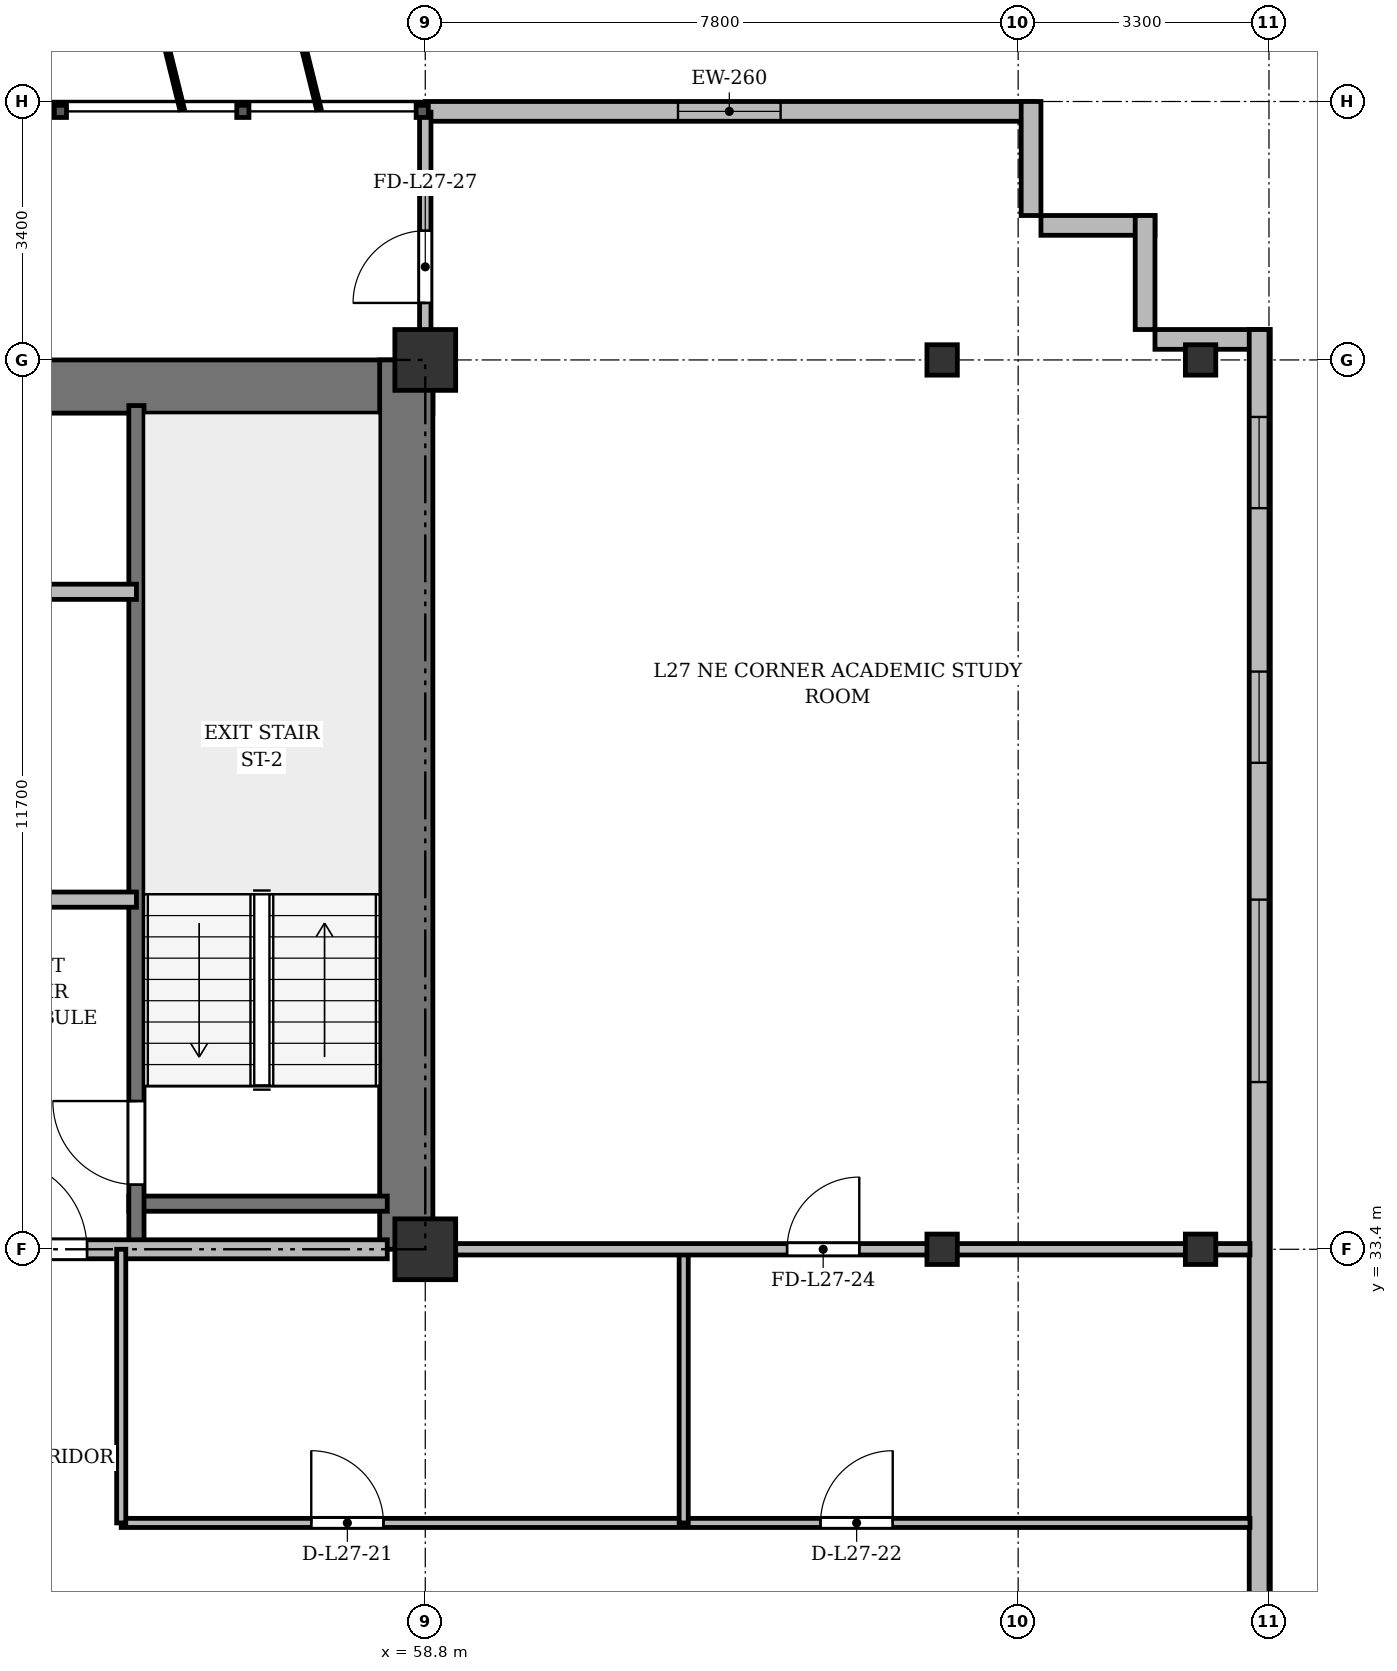
"""IFC4 building model, lengths in metres.
Left out: names, types, materials, properties, quantities, classifications, styles, units other than length and angle.
Written with IfcOpenShell. Run it as: python <this file> out.ifc"""

import sys

from ifc_helpers import new_model, si_unit, direction, frame, frame_2d, origin, origin_2d, place, context, subcontext, project, spatial, rectangle, i_section, extrude, source, transform, mapped, element, fill, save


model = new_model("IFC4")
c1 = context("Model", 3, precision=1e-05, world=origin(), true_north=direction((0.0, 1.0)))
c2 = subcontext(c1, "Body", "Model", "MODEL_VIEW")
j1 = project(units=[si_unit("LENGTHUNIT", "METRE"), si_unit("PLANEANGLEUNIT", "RADIAN")], contexts=[c1])
p1 = place(None, origin())
s1 = spatial("IfcSite", under=j1, at=p1, CompositionType="ELEMENT")
p2 = place(p1, origin())
s2 = spatial("IfcBuilding", under=s1, at=p2, CompositionType="ELEMENT")
p3 = place(p2, frame((0.0, 0.0, 106.9)))
s3 = spatial("IfcBuildingStorey", under=s2, at=p3, CompositionType="ELEMENT", Elevation=106.9)
m1 = source(origin(), c2, "Body", "SweptSolid", [
    extrude(rectangle(XDim=0.8, YDim=0.8, at=origin_2d()), origin(), (0.0, 0.0, 1.0), 3.6),
])
for number, where, z_axis, x_axis in (
    (1, (58.8, 33.4, 0.0), (0.0, 0.0, 1.0), (1.0, 0.0, 0.0)),
    (2, (58.8, 45.1, 0.0), (0.0, 0.0, 1.0), (1.0, 0.0, 0.0)),
):
    element("IfcColumn", number, at=place(p3, frame(where, z_axis=z_axis, x_axis=x_axis)), inside=s3, PredefinedType="COLUMN", context=c2, shape_type="MappedRepresentation", body=[
        mapped(m1, transform((0.0, 0.0, 0.0), x_axis=(1.0, 0.0, 0.0), y_axis=(0.0, 1.0, 0.0), z_axis=(0.0, 0.0, 1.0), scale=1.0)),
    ])
m2 = source(origin(), c2, "Body", "SweptSolid", [
    extrude(i_section(OverallWidth=0.4, OverallDepth=0.4, WebThickness=0.022, FlangeThickness=0.035, at=origin_2d()), origin(), (0.0, 0.0, 1.0), 3.6),
])
for number, where, z_axis, x_axis in (
    (3, (65.6, 33.4, 0.0), (0.0, 0.0, 1.0), (1.0, 0.0, 0.0)),
    (4, (65.6, 45.1, 0.0), (0.0, 0.0, 1.0), (1.0, 0.0, 0.0)),
    (5, (69.0, 33.4, 0.0), (0.0, 0.0, 1.0), (1.0, 0.0, 0.0)),
    (6, (69.0, 45.1, 0.0), (0.0, 0.0, 1.0), (1.0, 0.0, 0.0)),
):
    element("IfcColumn", number, at=place(p3, frame(where, z_axis=z_axis, x_axis=x_axis)), inside=s3, PredefinedType="COLUMN", context=c2, shape_type="MappedRepresentation", body=[
        mapped(m2, transform((0.0, 0.0, 0.0), x_axis=(1.0, 0.0, 0.0), y_axis=(0.0, 1.0, 0.0), z_axis=(0.0, 0.0, 1.0), scale=1.0)),
    ])
p4 = place(p3, frame((58.8, 48.37, 0.0), z_axis=(0.0, 0.0, 1.0), x_axis=(1.0, 0.0, 0.0)))
e7 = element("IfcWall", 7, at=p4, inside=s3, PredefinedType="SOLIDWALL", context=c2, shape_type="SweptSolid", body=[
    extrude(rectangle(XDim=8.0, YDim=0.26, at=frame_2d((4.0, 0.0))), origin(), (0.0, 0.0, 1.0), 3.34),
])
p5 = place(p4, frame((3.325, 0.0, 0.9)))
e8 = element("IfcOpeningElement", 8, at=p5, cuts=e7, PredefinedType="OPENING", context=c2, shape_type="SweptSolid", body=[
    extrude(rectangle(XDim=1.35, YDim=1.5, at=frame_2d((0.675, 0.75))), frame((0.0, 0.14, 0.0), z_axis=(0.0, -1.0, 0.0), x_axis=(1.0, 0.0, 0.0)), (0.0, 0.0, 1.0), 0.28),
])
for number, where, z_axis, x_axis in (
    (9, (66.77, 48.5, 0.0), (0.0, 0.0, 1.0), (0.0, -1.0, 0.0)),
    (10, (66.9, 46.87, 0.0), (0.0, 0.0, 1.0), (1.0, 0.0, 0.0)),
    (11, (68.27, 47.0, 0.0), (0.0, 0.0, 1.0), (0.0, -1.0, 0.0)),
):
    element("IfcWall", number, at=place(p3, frame(where, z_axis=z_axis, x_axis=x_axis)), inside=s3, PredefinedType="SOLIDWALL", context=c2, shape_type="SweptSolid", body=[
        extrude(rectangle(XDim=1.5, YDim=0.26, at=frame_2d((0.75, 0.0))), origin(), (0.0, 0.0, 1.0), 3.34),
    ])
p6 = place(p3, frame((68.4, 45.37, 0.0), z_axis=(0.0, 0.0, 1.0), x_axis=(1.0, 0.0, 0.0)))
e12 = element("IfcWall", 12, at=p6, inside=s3, PredefinedType="SOLIDWALL", context=c2, shape_type="SweptSolid", body=[
    extrude(rectangle(XDim=1.5, YDim=0.26, at=frame_2d((0.75, 0.0))), origin(), (0.0, 0.0, 1.0), 2.752),
])
p7 = place(p3, frame((69.77, 45.5, 0.0), z_axis=(0.0, 0.0, 1.0), x_axis=(0.0, -1.0, 0.0)))
e13 = element("IfcWall", 13, at=p7, inside=s3, PredefinedType="SOLIDWALL", context=c2, shape_type="SweptSolid", body=[
    extrude(rectangle(XDim=39.6, YDim=0.26, at=frame_2d((19.8, 0.0))), origin(), (0.0, 0.0, 1.0), 3.34),
])
p8 = place(p7, frame((36.95, 0.0, 0.92)))
e14 = element("IfcOpeningElement", 14, at=p8, cuts=e13, PredefinedType="OPENING", context=c2, shape_type="SweptSolid", body=[
    extrude(rectangle(XDim=1.2, YDim=1.65, at=frame_2d((0.6, 0.825))), frame((0.0, 0.14, 0.0), z_axis=(0.0, -1.0, 0.0), x_axis=(1.0, 0.0, 0.0)), (0.0, 0.0, 1.0), 0.28),
])
p9 = place(p7, frame((32.9, 0.0, 0.92)))
e15 = element("IfcOpeningElement", 15, at=p9, cuts=e13, PredefinedType="OPENING", context=c2, shape_type="SweptSolid", body=[
    extrude(rectangle(XDim=2.4, YDim=2.1, at=frame_2d((1.2, 1.05))), frame((0.0, 0.14, 0.0), z_axis=(0.0, -1.0, 0.0), x_axis=(1.0, 0.0, 0.0)), (0.0, 0.0, 1.0), 0.28),
])
p10 = place(p7, frame((28.7, 0.0, 0.92)))
e16 = element("IfcOpeningElement", 16, at=p10, cuts=e13, PredefinedType="OPENING", context=c2, shape_type="SweptSolid", body=[
    extrude(rectangle(XDim=2.4, YDim=2.1, at=frame_2d((1.2, 1.05))), frame((0.0, 0.14, 0.0), z_axis=(0.0, -1.0, 0.0), x_axis=(1.0, 0.0, 0.0)), (0.0, 0.0, 1.0), 0.28),
])
p11 = place(p7, frame((21.5, 0.0, 0.92)))
e17 = element("IfcOpeningElement", 17, at=p11, cuts=e13, PredefinedType="OPENING", context=c2, shape_type="SweptSolid", body=[
    extrude(rectangle(XDim=2.4, YDim=2.1, at=frame_2d((1.2, 1.05))), frame((0.0, 0.14, 0.0), z_axis=(0.0, -1.0, 0.0), x_axis=(1.0, 0.0, 0.0)), (0.0, 0.0, 1.0), 0.28),
])
p12 = place(p7, frame((7.5, 0.0, 0.92)))
e18 = element("IfcOpeningElement", 18, at=p12, cuts=e13, PredefinedType="OPENING", context=c2, shape_type="SweptSolid", body=[
    extrude(rectangle(XDim=2.4, YDim=2.1, at=frame_2d((1.2, 1.05))), frame((0.0, 0.14, 0.0), z_axis=(0.0, -1.0, 0.0), x_axis=(1.0, 0.0, 0.0)), (0.0, 0.0, 1.0), 0.28),
])
p13 = place(p7, frame((4.5, 0.0, 0.92)))
e19 = element("IfcOpeningElement", 19, at=p13, cuts=e13, PredefinedType="OPENING", context=c2, shape_type="SweptSolid", body=[
    extrude(rectangle(XDim=1.2, YDim=1.65, at=frame_2d((0.6, 0.825))), frame((0.0, 0.14, 0.0), z_axis=(0.0, -1.0, 0.0), x_axis=(1.0, 0.0, 0.0)), (0.0, 0.0, 1.0), 0.28),
])
p14 = place(p7, frame((1.15, 0.0, 0.92)))
e20 = element("IfcOpeningElement", 20, at=p14, cuts=e13, PredefinedType="OPENING", context=c2, shape_type="SweptSolid", body=[
    extrude(rectangle(XDim=1.2, YDim=1.65, at=frame_2d((0.6, 0.825))), frame((0.0, 0.14, 0.0), z_axis=(0.0, -1.0, 0.0), x_axis=(1.0, 0.0, 0.0)), (0.0, 0.0, 1.0), 0.28),
])
p15 = place(p3, frame((15.5, 44.75, 0.0), z_axis=(0.0, 0.0, 1.0), x_axis=(1.0, 0.0, 0.0)))
e21 = element("IfcWall", 21, at=p15, inside=s3, PredefinedType="SHEAR", context=c2, shape_type="SweptSolid", body=[
    extrude(rectangle(XDim=43.4, YDim=0.7, at=frame_2d((21.7, 0.0))), origin(), (0.0, 0.0, 1.0), 3.34),
])
p16 = place(p3, frame((58.55, 33.4, 0.0), z_axis=(0.0, 0.0, 1.0), x_axis=(0.0, 1.0, 0.0)))
e22 = element("IfcWall", 22, at=p16, inside=s3, PredefinedType="SHEAR", context=c2, shape_type="SweptSolid", body=[
    extrude(rectangle(XDim=11.7, YDim=0.7, at=frame_2d((5.85, 0.0))), origin(), (0.0, 0.0, 1.0), 3.34),
])
p17 = place(p3, frame((54.9, 34.0, 0.0), z_axis=(0.0, 0.0, 1.0), x_axis=(1.0, 0.0, 0.0)))
e23 = element("IfcWall", 23, at=p17, inside=s3, PredefinedType="SHEAR", context=c2, shape_type="SweptSolid", body=[
    extrude(rectangle(XDim=3.4, YDim=0.2, at=frame_2d((1.7, 0.0))), origin(), (0.0, 0.0, 1.0), 3.34),
])
p18 = place(p3, frame((55.0, 33.4, 0.0), z_axis=(0.0, 0.0, 1.0), x_axis=(0.0, 1.0, 0.0)))
e24 = element("IfcWall", 24, at=p18, inside=s3, PredefinedType="SHEAR", context=c2, shape_type="SweptSolid", body=[
    extrude(rectangle(XDim=11.1, YDim=0.2, at=frame_2d((5.55, 0.0))), origin(), (0.0, 0.0, 1.0), 3.34),
])
p19 = place(p18, frame((0.85, 0.0, 0.0)))
e25 = element("IfcOpeningElement", 25, at=p19, cuts=e24, PredefinedType="OPENING", context=c2, shape_type="SweptSolid", body=[
    extrude(rectangle(XDim=1.1, YDim=2.15, at=frame_2d((0.55, 1.075))), frame((0.0, 0.11, 0.0), z_axis=(0.0, -1.0, 0.0), x_axis=(1.0, 0.0, 0.0)), (0.0, 0.0, 1.0), 0.22),
])
p20 = place(p3, frame((47.15, 42.05, 0.0), z_axis=(0.0, 0.0, 1.0), x_axis=(1.0, 0.0, 0.0)))
e26 = element("IfcWall", 26, at=p20, inside=s3, PredefinedType="SOLIDWALL", context=c2, shape_type="SweptSolid", body=[
    extrude(rectangle(XDim=7.85, YDim=0.2, at=frame_2d((3.925, 0.0))), origin(), (0.0, 0.0, 1.0), 2.84),
])
p21 = place(p20, frame((0.75, 0.0, 0.0)))
e27 = element("IfcOpeningElement", 27, at=p21, cuts=e26, PredefinedType="OPENING", context=c2, shape_type="SweptSolid", body=[
    extrude(rectangle(XDim=0.9, YDim=2.1, at=frame_2d((0.45, 1.05))), frame((0.0, 0.11, 0.0), z_axis=(0.0, -1.0, 0.0), x_axis=(1.0, 0.0, 0.0)), (0.0, 0.0, 1.0), 0.22),
])
p22 = place(p20, frame((3.85, 0.0, 0.0)))
e28 = element("IfcOpeningElement", 28, at=p22, cuts=e26, PredefinedType="OPENING", context=c2, shape_type="SweptSolid", body=[
    extrude(rectangle(XDim=0.9, YDim=2.1, at=frame_2d((0.45, 1.05))), frame((0.0, 0.11, 0.0), z_axis=(0.0, -1.0, 0.0), x_axis=(1.0, 0.0, 0.0)), (0.0, 0.0, 1.0), 0.22),
])
p23 = place(p3, frame((52.45, 38.0, 0.0), z_axis=(0.0, 0.0, 1.0), x_axis=(1.0, 0.0, 0.0)))
e29 = element("IfcWall", 29, at=p23, inside=s3, PredefinedType="PARTITIONING", context=c2, shape_type="SweptSolid", body=[
    extrude(rectangle(XDim=2.55, YDim=0.2, at=frame_2d((1.275, 0.0))), origin(), (0.0, 0.0, 1.0), 3.34),
])
p24 = place(p3, frame((47.15, 33.4, 0.0), z_axis=(0.0, 0.0, 1.0), x_axis=(1.0, 0.0, 0.0)))
e30 = element("IfcWall", 30, at=p24, inside=s3, PredefinedType="PARTITIONING", context=c2, shape_type="SweptSolid", body=[
    extrude(rectangle(XDim=11.15, YDim=0.25, at=frame_2d((5.575, 0.0))), origin(), (0.0, 0.0, 1.0), 2.752),
])
p25 = place(p24, frame((0.7, 0.0, 0.0)))
e31 = element("IfcOpeningElement", 31, at=p25, cuts=e30, PredefinedType="OPENING", context=c2, shape_type="SweptSolid", body=[
    extrude(rectangle(XDim=0.95, YDim=2.15, at=frame_2d((0.475, 1.075))), frame((0.0, 0.135, 0.0), z_axis=(0.0, -1.0, 0.0), x_axis=(1.0, 0.0, 0.0)), (0.0, 0.0, 1.0), 0.27),
])
p26 = place(p24, frame((6.0, 0.0, 0.0)))
e32 = element("IfcOpeningElement", 32, at=p26, cuts=e30, PredefinedType="OPENING", context=c2, shape_type="SweptSolid", body=[
    extrude(rectangle(XDim=1.2, YDim=2.15, at=frame_2d((0.6, 1.075))), frame((0.0, 0.135, 0.0), z_axis=(0.0, -1.0, 0.0), x_axis=(1.0, 0.0, 0.0)), (0.0, 0.0, 1.0), 0.27),
])
p27 = place(p3, frame((54.8, 29.8, 0.0), z_axis=(0.0, 0.0, 1.0), x_axis=(1.0, 0.0, 0.0)))
e33 = element("IfcWall", 33, at=p27, inside=s3, PredefinedType="PARTITIONING", context=c2, shape_type="SweptSolid", body=[
    extrude(rectangle(XDim=14.85, YDim=0.12, at=frame_2d((7.425, 0.0))), origin(), (0.0, 0.0, 1.0), 2.84),
])
p28 = place(p27, frame((2.5, 0.0, 0.0)))
e34 = element("IfcOpeningElement", 34, at=p28, cuts=e33, PredefinedType="OPENING", context=c2, shape_type="SweptSolid", body=[
    extrude(rectangle(XDim=0.95, YDim=2.15, at=frame_2d((0.475, 1.075))), frame((0.0, 0.07, 0.0), z_axis=(0.0, -1.0, 0.0), x_axis=(1.0, 0.0, 0.0)), (0.0, 0.0, 1.0), 0.14),
])
p29 = place(p27, frame((9.2, 0.0, 0.0)))
e35 = element("IfcOpeningElement", 35, at=p29, cuts=e33, PredefinedType="OPENING", context=c2, shape_type="SweptSolid", body=[
    extrude(rectangle(XDim=0.95, YDim=2.15, at=frame_2d((0.475, 1.075))), frame((0.0, 0.07, 0.0), z_axis=(0.0, -1.0, 0.0), x_axis=(1.0, 0.0, 0.0)), (0.0, 0.0, 1.0), 0.14),
])
for number, where, z_axis, x_axis in (
    (36, (62.2, 29.8, 0.0), (0.0, 0.0, 1.0), (0.0, 1.0, 0.0)),
    (37, (54.8, 29.8, 0.0), (0.0, 0.0, 1.0), (0.0, 1.0, 0.0)),
):
    element("IfcWall", number, at=place(p3, frame(where, z_axis=z_axis, x_axis=x_axis)), inside=s3, PredefinedType="PARTITIONING", context=c2, shape_type="SweptSolid", body=[
        extrude(rectangle(XDim=3.6, YDim=0.12, at=frame_2d((1.8, 0.0))), origin(), (0.0, 0.0, 1.0), 2.752),
    ])
p30 = place(p3, frame((58.8, 33.4, 0.0), z_axis=(0.0, 0.0, 1.0), x_axis=(1.0, 0.0, 0.0)))
e38 = element("IfcWall", 38, at=p30, inside=s3, PredefinedType="PARTITIONING", context=c2, shape_type="SweptSolid", body=[
    extrude(rectangle(XDim=10.85, YDim=0.15, at=frame_2d((5.425, 0.0))), origin(), (0.0, 0.0, 1.0), 2.752),
])
p31 = place(p30, frame((4.76, 0.0, 0.0)))
e39 = element("IfcOpeningElement", 39, at=p31, cuts=e38, PredefinedType="OPENING", context=c2, shape_type="SweptSolid", body=[
    extrude(rectangle(XDim=0.95, YDim=2.15, at=frame_2d((0.475, 1.075))), frame((0.0, 0.085, 0.0), z_axis=(0.0, -1.0, 0.0), x_axis=(1.0, 0.0, 0.0)), (0.0, 0.0, 1.0), 0.17),
])
p32 = place(p3, frame((58.8, 44.75, 0.0), z_axis=(0.0, 0.0, 1.0), x_axis=(0.0, 1.0, 0.0)))
e40 = element("IfcWall", 40, at=p32, inside=s3, PredefinedType="PARTITIONING", context=c2, shape_type="SweptSolid", body=[
    extrude(rectangle(XDim=3.61, YDim=0.15, at=frame_2d((1.805, 0.0))), origin(), (0.0, 0.0, 1.0), 2.84),
])
p33 = place(p32, frame((1.1, 0.0, 0.0)))
e41 = element("IfcOpeningElement", 41, at=p33, cuts=e40, PredefinedType="OPENING", context=c2, shape_type="SweptSolid", body=[
    extrude(rectangle(XDim=0.95, YDim=2.15, at=frame_2d((0.475, 1.075))), frame((0.0, 0.085, 0.0), z_axis=(0.0, -1.0, 0.0), x_axis=(1.0, 0.0, 0.0)), (0.0, 0.0, 1.0), 0.17),
])
m3 = source(origin(), c2, "Body", "SweptSolid", [
    extrude(rectangle(XDim=1.35, YDim=1.5, at=frame_2d((0.675, 0.75))), frame((0.0, 0.03, 0.0), z_axis=(0.0, -1.0, 0.0), x_axis=(1.0, 0.0, 0.0)), (0.0, 0.0, 1.0), 0.06),
])
p34 = place(p5, origin())
e42 = element("IfcWindow", 42, at=p34, inside=s3, PartitioningType="SINGLE_PANEL", PredefinedType="WINDOW", context=c2, shape_type="MappedRepresentation", body=[
    mapped(m3, transform((0.0, 0.0, 0.0), x_axis=(1.0, 0.0, 0.0), y_axis=(0.0, 1.0, 0.0), z_axis=(0.0, 0.0, 1.0), scale=1.0)),
])
fill(e8, e42)
m4 = source(origin(), c2, "Body", "SweptSolid", [
    extrude(rectangle(XDim=2.4, YDim=2.1, at=frame_2d((1.2, 1.05))), frame((0.0, 0.03, 0.0), z_axis=(0.0, -1.0, 0.0), x_axis=(1.0, 0.0, 0.0)), (0.0, 0.0, 1.0), 0.06),
])
p35 = place(p12, origin())
e43 = element("IfcWindow", 43, at=p35, inside=s3, PartitioningType="SINGLE_PANEL", PredefinedType="WINDOW", context=c2, shape_type="MappedRepresentation", body=[
    mapped(m4, transform((0.0, 0.0, 0.0), x_axis=(1.0, 0.0, 0.0), y_axis=(0.0, 1.0, 0.0), z_axis=(0.0, 0.0, 1.0), scale=1.0)),
])
fill(e18, e43)
m5 = source(origin(), c2, "Body", "SweptSolid", [
    extrude(rectangle(XDim=1.2, YDim=1.65, at=frame_2d((0.6, 0.825))), frame((0.0, 0.03, 0.0), z_axis=(0.0, -1.0, 0.0), x_axis=(1.0, 0.0, 0.0)), (0.0, 0.0, 1.0), 0.06),
])
p36 = place(p13, origin())
e44 = element("IfcWindow", 44, at=p36, inside=s3, PartitioningType="SINGLE_PANEL", PredefinedType="WINDOW", context=c2, shape_type="MappedRepresentation", body=[
    mapped(m5, transform((0.0, 0.0, 0.0), x_axis=(1.0, 0.0, 0.0), y_axis=(0.0, 1.0, 0.0), z_axis=(0.0, 0.0, 1.0), scale=1.0)),
])
fill(e19, e44)
p37 = place(p14, origin())
e45 = element("IfcWindow", 45, at=p37, inside=s3, PartitioningType="SINGLE_PANEL", PredefinedType="WINDOW", context=c2, shape_type="MappedRepresentation", body=[
    mapped(m5, transform((0.0, 0.0, 0.0), x_axis=(1.0, 0.0, 0.0), y_axis=(0.0, 1.0, 0.0), z_axis=(0.0, 0.0, 1.0), scale=1.0)),
])
fill(e20, e45)
m6 = source(origin(), c2, "Body", "SweptSolid", [
    extrude(rectangle(XDim=1.1, YDim=2.15, at=frame_2d((0.55, 1.075))), frame((0.0, 0.025, 0.0), z_axis=(0.0, -1.0, 0.0), x_axis=(1.0, 0.0, 0.0)), (0.0, 0.0, 1.0), 0.05),
])
p38 = place(p19, origin())
e46 = element("IfcDoor", 46, at=p38, inside=s3, OperationType="SINGLE_SWING_RIGHT", PredefinedType="DOOR", context=c2, shape_type="MappedRepresentation", body=[
    mapped(m6, transform((0.0, 0.0, 0.0), x_axis=(1.0, 0.0, 0.0), y_axis=(0.0, 1.0, 0.0), z_axis=(0.0, 0.0, 1.0), scale=1.0)),
])
fill(e25, e46)
m7 = source(origin(), c2, "Body", "SweptSolid", [
    extrude(rectangle(XDim=1.2, YDim=2.15, at=frame_2d((0.6, 1.075))), frame((0.0, 0.025, 0.0), z_axis=(0.0, -1.0, 0.0), x_axis=(1.0, 0.0, 0.0)), (0.0, 0.0, 1.0), 0.05),
])
p39 = place(p26, origin())
e47 = element("IfcDoor", 47, at=p39, inside=s3, OperationType="SINGLE_SWING_LEFT", PredefinedType="DOOR", context=c2, shape_type="MappedRepresentation", body=[
    mapped(m7, transform((0.0, 0.0, 0.0), x_axis=(1.0, 0.0, 0.0), y_axis=(0.0, 1.0, 0.0), z_axis=(0.0, 0.0, 1.0), scale=1.0)),
])
fill(e32, e47)
m8 = source(origin(), c2, "Body", "SweptSolid", [
    extrude(rectangle(XDim=0.95, YDim=2.15, at=frame_2d((0.475, 1.075))), frame((0.0, 0.025, 0.0), z_axis=(0.0, -1.0, 0.0), x_axis=(1.0, 0.0, 0.0)), (0.0, 0.0, 1.0), 0.05),
])
p40 = place(p28, origin())
e48 = element("IfcDoor", 48, at=p40, inside=s3, OperationType="SINGLE_SWING_LEFT", PredefinedType="DOOR", context=c2, shape_type="MappedRepresentation", body=[
    mapped(m8, transform((0.0, 0.0, 0.0), x_axis=(1.0, 0.0, 0.0), y_axis=(0.0, 1.0, 0.0), z_axis=(0.0, 0.0, 1.0), scale=1.0)),
])
fill(e34, e48)
p41 = place(p29, origin())
e49 = element("IfcDoor", 49, at=p41, inside=s3, OperationType="SINGLE_SWING_RIGHT", PredefinedType="DOOR", context=c2, shape_type="MappedRepresentation", body=[
    mapped(m8, transform((0.0, 0.0, 0.0), x_axis=(1.0, 0.0, 0.0), y_axis=(0.0, 1.0, 0.0), z_axis=(0.0, 0.0, 1.0), scale=1.0)),
])
fill(e35, e49)
p42 = place(p31, origin())
e50 = element("IfcDoor", 50, at=p42, inside=s3, OperationType="SINGLE_SWING_RIGHT", PredefinedType="DOOR", context=c2, shape_type="MappedRepresentation", body=[
    mapped(m8, transform((0.0, 0.0, 0.0), x_axis=(1.0, 0.0, 0.0), y_axis=(0.0, 1.0, 0.0), z_axis=(0.0, 0.0, 1.0), scale=1.0)),
])
fill(e39, e50)
p43 = place(p33, origin())
e51 = element("IfcDoor", 51, at=p43, inside=s3, OperationType="SINGLE_SWING_LEFT", PredefinedType="DOOR", context=c2, shape_type="MappedRepresentation", body=[
    mapped(m8, transform((0.0, 0.0, 0.0), x_axis=(1.0, 0.0, 0.0), y_axis=(0.0, 1.0, 0.0), z_axis=(0.0, 0.0, 1.0), scale=1.0)),
])
fill(e41, e51)
save(model, sys.argv[1])
